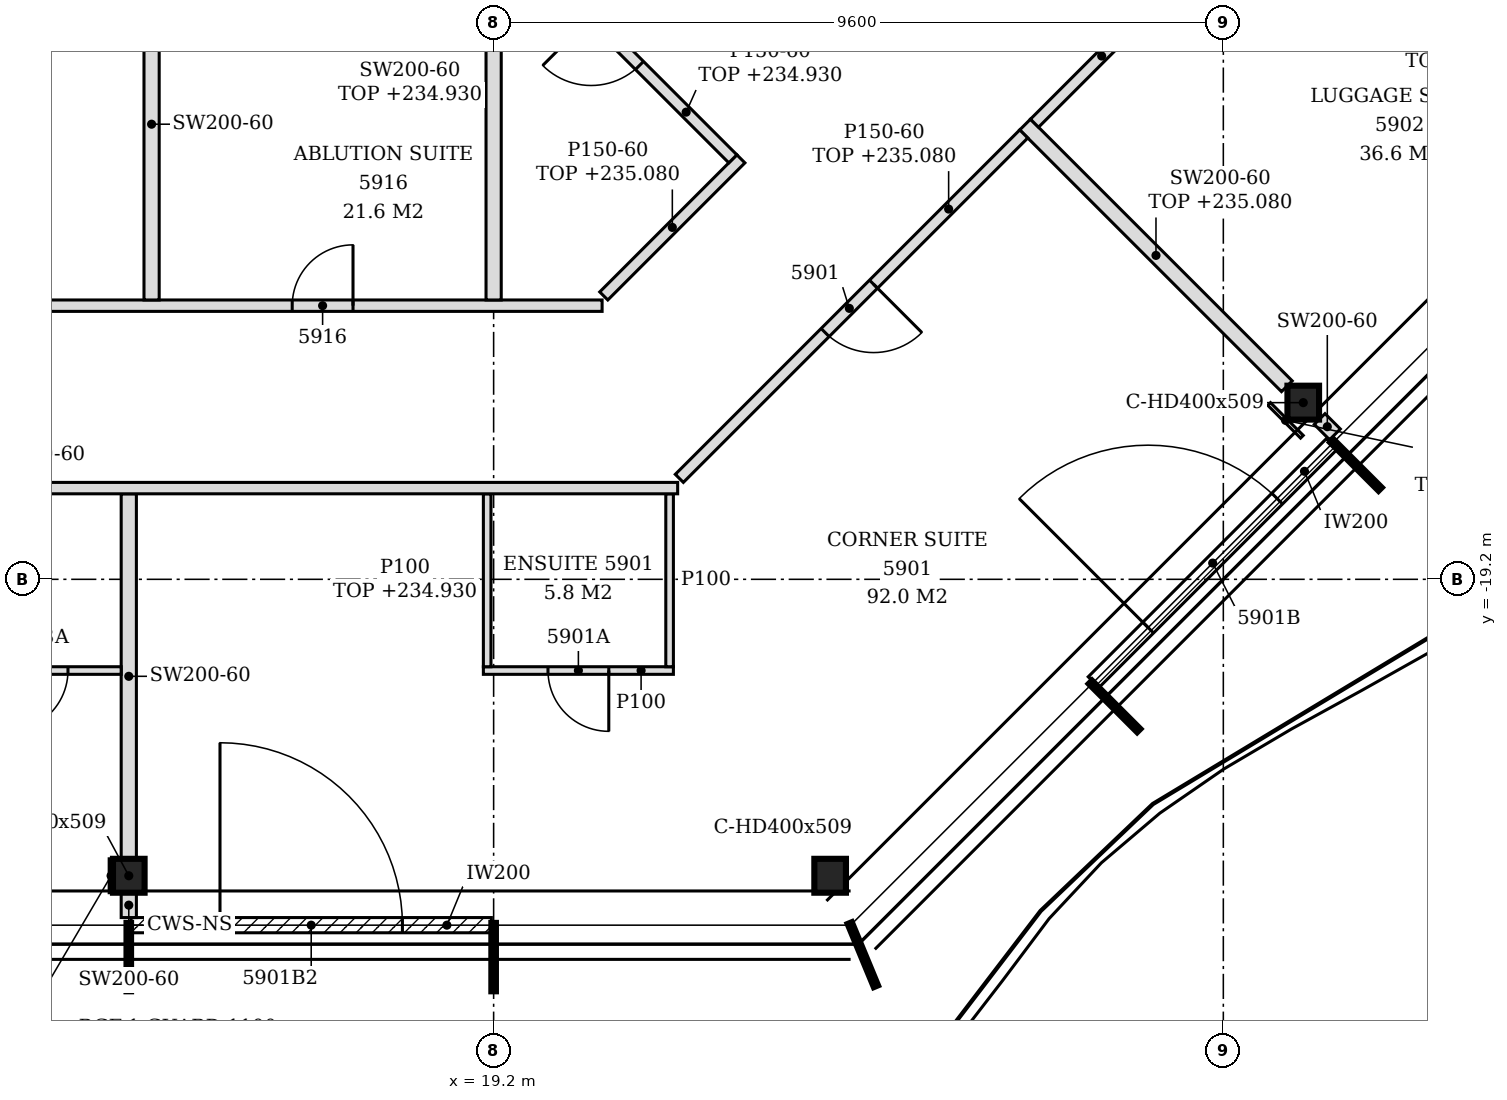
"""IFC4 building model, lengths in metres.
Left out: names, types, materials, properties, quantities, classifications, styles, units other than length and angle.
Written with IfcOpenShell. Run it as: python <this file> out.ifc"""

import sys

from ifc_helpers import new_model, si_unit, direction, frame, frame_2d, origin, origin_2d, place, context, subcontext, project, spatial, polyline, rectangle, i_section, outline, extrude, element, fill, save


model = new_model("IFC4")
c1 = context("Model", 3, precision=1e-05, world=origin(), true_north=direction((0.0, 1.0)))
c2 = subcontext(c1, "Body", "Model", "MODEL_VIEW")
j1 = project(units=[si_unit("LENGTHUNIT", "METRE"), si_unit("PLANEANGLEUNIT", "RADIAN")], contexts=[c1])
p1 = place(None, origin())
s1 = spatial("IfcSite", under=j1, at=p1, CompositionType="ELEMENT")
p2 = place(p1, origin())
s2 = spatial("IfcBuilding", under=s1, at=p2, CompositionType="ELEMENT")
p3 = place(p2, frame((0.0, 0.0, 232.2)))
s3 = spatial("IfcBuildingStorey", under=s2, at=p3, CompositionType="ELEMENT", Elevation=232.2)
for number, where, z_axis, x_axis in (
    (1, (14.4, -23.1, -0.15), (0.0, 0.0, 1.0), (1.0, 0.0, 0.0)),
    (2, (23.627, -23.1, -0.15), (0.0, 0.0, 1.0), (1.0, 0.0, 0.0)),
    (3, (29.852, -16.876, -0.15), (0.0, 0.0, 1.0), (1.0, 0.0, 0.0)),
):
    element("IfcColumn", number, at=place(p3, frame(where, z_axis=z_axis, x_axis=x_axis)), inside=s3, PredefinedType="COLUMN", context=c2, shape_type="SweptSolid", body=[
        extrude(i_section(OverallWidth=0.416, OverallDepth=0.446, WebThickness=0.039, FlangeThickness=0.063, FilletRadius=0.015, at=origin_2d()), origin(), (0.0, 0.0, 1.0), 3.6),
    ])
p4 = place(p3, frame((14.43, -23.75, 0.0), z_axis=(0.0, 0.0, 1.0), x_axis=(1.0, 0.0, 0.0)))
e4 = element("IfcWall", 4, at=p4, inside=s3, PredefinedType="NOTDEFINED", context=c2, shape_type="SweptSolid", body=[
    extrude(rectangle(XDim=4.74, YDim=0.2, at=frame_2d((2.37, 0.0))), origin(), (0.0, 0.0, 1.0), 3.45),
])
p5 = place(p4, frame((1.17, 0.0, 0.0)))
e5 = element("IfcOpeningElement", 5, at=p5, cuts=e4, PredefinedType="OPENING", context=c2, shape_type="SweptSolid", body=[
    extrude(rectangle(XDim=2.4, YDim=2.4, at=frame_2d((1.2, 1.2))), frame((0.0, 0.11, 0.0), z_axis=(0.0, -1.0, 0.0), x_axis=(1.0, 0.0, 0.0)), (0.0, 0.0, 1.0), 0.22),
])
p6 = place(p3, frame((27.093, -20.553, 0.0), z_axis=(0.0, 0.0, 1.0), x_axis=(0.707079231393, 0.707134329907, 0.0)))
e6 = element("IfcWall", 6, at=p6, inside=s3, PredefinedType="NOTDEFINED", context=c2, shape_type="SweptSolid", body=[
    extrude(rectangle(XDim=4.431, YDim=0.2, at=frame_2d((2.215, 0.0))), origin(), (0.0, 0.0, 1.0), 3.45),
])
p7 = place(p6, frame((1.015, 0.0, 0.0)))
e7 = element("IfcOpeningElement", 7, at=p7, cuts=e6, PredefinedType="OPENING", context=c2, shape_type="SweptSolid", body=[
    extrude(rectangle(XDim=2.4, YDim=2.4, at=frame_2d((1.2, 1.2))), frame((0.0, 0.11, 0.0), z_axis=(0.0, -1.0, 0.0), x_axis=(1.0, 0.0, 0.0)), (0.0, 0.0, 1.0), 0.22),
])
p8 = place(p3, frame((14.4, -23.65, 0.0), z_axis=(0.0, 0.0, 1.0), x_axis=(0.0, 1.0, 0.0)))
e8 = element("IfcWall", 8, at=p8, inside=s3, PredefinedType="PARTITIONING", context=c2, shape_type="SweptSolid", body=[
    extrude(rectangle(XDim=0.327, YDim=0.2, at=frame_2d((0.164, 0.0))), origin(), (0.0, 0.0, 1.0), 3.45),
])
p9 = place(p3, frame((14.4, -22.877, 0.0), z_axis=(0.0, 0.0, 1.0), x_axis=(0.0, 1.0, 0.0)))
e9 = element("IfcWall", 9, at=p9, inside=s3, PredefinedType="PARTITIONING", context=c2, shape_type="SweptSolid", body=[
    extrude(outline(polyline([(0.0, 0.0), (4.802, 0.0), (4.802, 3.45), (3.782, 3.45), (3.78, 2.88), (3.572, 2.88), (3.57, 3.45), (0.0, 3.45), (0.0, 0.0)])), frame((0.0, 0.1, 0.0), z_axis=(0.0, -1.0, 0.0), x_axis=(1.0, 0.0, 0.0)), (0.0, 0.0, 1.0), 0.2),
])
p10 = place(p3, frame((11.95, -20.4, 0.0), z_axis=(0.0, 0.0, 1.0), x_axis=(1.0, 0.0, 0.0)))
e10 = element("IfcWall", 10, at=p10, inside=s3, PredefinedType="PARTITIONING", context=c2, shape_type="SweptSolid", body=[
    extrude(rectangle(XDim=2.35, YDim=0.1, at=frame_2d((1.175, 0.0))), origin(), (0.0, 0.0, 1.0), 3.45),
])
p11 = place(p10, frame((0.85, 0.0, 0.0)))
e11 = element("IfcOpeningElement", 11, at=p11, cuts=e10, PredefinedType="OPENING", context=c2, shape_type="SweptSolid", body=[
    extrude(rectangle(XDim=0.8, YDim=2.1, at=frame_2d((0.4, 1.05))), frame((0.0, 0.06, 0.0), z_axis=(0.0, -1.0, 0.0), x_axis=(1.0, 0.0, 0.0)), (0.0, 0.0, 1.0), 0.12),
])
p12 = place(p3, frame((19.065, -20.4, 0.0), z_axis=(0.0, 0.0, 1.0), x_axis=(1.0, 0.0, 0.0)))
e12 = element("IfcWall", 12, at=p12, inside=s3, PredefinedType="PARTITIONING", context=c2, shape_type="SweptSolid", body=[
    extrude(outline(polyline([(0.0, 0.0), (2.5, 0.0), (2.5, 3.45), (0.285, 3.45), (0.283, 2.73), (0.0, 2.73), (0.0, 0.0)])), frame((0.0, 0.05, 0.0), z_axis=(0.0, -1.0, 0.0), x_axis=(1.0, 0.0, 0.0)), (0.0, 0.0, 1.0), 0.1),
])
p13 = place(p12, frame((0.85, 0.0, 0.0)))
e13 = element("IfcOpeningElement", 13, at=p13, cuts=e12, PredefinedType="OPENING", context=c2, shape_type="SweptSolid", body=[
    extrude(rectangle(XDim=0.8, YDim=2.1, at=frame_2d((0.4, 1.05))), frame((0.0, 0.06, 0.0), z_axis=(0.0, -1.0, 0.0), x_axis=(1.0, 0.0, 0.0)), (0.0, 0.0, 1.0), 0.12),
])
p14 = place(p3, frame((19.115, -20.35, 0.0), z_axis=(0.0, 0.0, 1.0), x_axis=(0.0, 1.0, 0.0)))
e14 = element("IfcWall", 14, at=p14, inside=s3, PredefinedType="PARTITIONING", context=c2, shape_type="SweptSolid", body=[
    extrude(rectangle(XDim=2.275, YDim=0.1, at=frame_2d((1.138, 0.0))), origin(), (0.0, 0.0, 1.0), 2.73),
])
p15 = place(p3, frame((21.515, -20.35, 0.0), z_axis=(0.0, 0.0, 1.0), x_axis=(0.0, 1.0, 0.0)))
e15 = element("IfcWall", 15, at=p15, inside=s3, PredefinedType="PARTITIONING", context=c2, shape_type="SweptSolid", body=[
    extrude(outline(polyline([(0.0, 0.0), (2.275, 0.0), (2.275, 3.45), (1.245, 3.45), (1.243, 2.98), (1.055, 2.98), (1.053, 3.45), (0.0, 3.45), (0.0, 0.0)])), frame((0.0, 0.05, 0.0), z_axis=(0.0, -1.0, 0.0), x_axis=(1.0, 0.0, 0.0)), (0.0, 0.0, 1.0), 0.1),
])
p16 = place(p3, frame((-0.726, -18.0, 0.0), z_axis=(0.0, 0.0, 1.0), x_axis=(1.0, 0.0, 0.0)))
e16 = element("IfcWall", 16, at=p16, inside=s3, PredefinedType="PARTITIONING", context=c2, shape_type="SweptSolid", body=[
    extrude(outline(polyline([(0.0, 0.0), (22.347, 0.0), (22.347, 3.45), (20.076, 3.45), (20.074, 2.73), (19.776, 2.73), (19.774, 3.45), (8.076, 3.45), (8.074, 2.73), (7.776, 2.73), (7.774, 3.45), (1.086, 3.45), (1.084, 2.93), (0.512, 2.93), (0.51, 3.45), (0.0, 3.45), (0.0, 0.0)])), frame((0.0, 0.075, 0.0), z_axis=(0.0, -1.0, 0.0), x_axis=(1.0, 0.0, 0.0)), (0.0, 0.0, 1.0), 0.15),
])
p17 = place(p16, frame((5.676, 0.0, 0.0)))
e17 = element("IfcOpeningElement", 17, at=p17, cuts=e16, PredefinedType="OPENING", context=c2, shape_type="SweptSolid", body=[
    extrude(rectangle(XDim=0.9, YDim=2.1, at=frame_2d((0.45, 1.05))), frame((0.0, 0.085, 0.0), z_axis=(0.0, -1.0, 0.0), x_axis=(1.0, 0.0, 0.0)), (0.0, 0.0, 1.0), 0.17),
])
p18 = place(p3, frame((21.643, -17.872, 0.0), z_axis=(0.0, 0.0, 1.0), x_axis=(0.707106781187, 0.707106781187, 0.0)))
e18 = element("IfcWall", 18, at=p18, inside=s3, PredefinedType="PARTITIONING", context=c2, shape_type="SweptSolid", body=[
    extrude(rectangle(XDim=6.408, YDim=0.15, at=frame_2d((3.204, 0.0))), origin(), (0.0, 0.0, 1.0), 2.88),
])
p19 = place(p18, frame((2.713, 0.0, 0.0)))
e19 = element("IfcOpeningElement", 19, at=p19, cuts=e18, PredefinedType="OPENING", context=c2, shape_type="SweptSolid", body=[
    extrude(rectangle(XDim=0.9, YDim=2.1, at=frame_2d((0.45, 1.05))), frame((0.0, 0.085, 0.0), z_axis=(0.0, -1.0, 0.0), x_axis=(1.0, 0.0, 0.0)), (0.0, 0.0, 1.0), 0.17),
])
p20 = place(p3, frame((30.269, -17.293, 0.0), z_axis=(0.0, 0.0, 1.0), x_axis=(-0.707534941396, 0.706678361564, 0.0)))
e20 = element("IfcWall", 20, at=p20, inside=s3, PredefinedType="PARTITIONING", context=c2, shape_type="SweptSolid", body=[
    extrude(rectangle(XDim=0.285, YDim=0.2, at=frame_2d((0.143, 0.0))), origin(), (0.0, 0.0, 1.0), 3.45),
])
p21 = place(p3, frame((29.636, -16.66, 0.0), z_axis=(0.0, 0.0, 1.0), x_axis=(-0.707207037357, 0.707006510799, 0.0)))
e21 = element("IfcWall", 21, at=p21, inside=s3, PredefinedType="PARTITIONING", context=c2, shape_type="SweptSolid", body=[
    extrude(rectangle(XDim=4.87, YDim=0.2, at=frame_2d((2.435, 0.0))), origin(), (0.0, 0.0, 1.0), 2.88),
])
p22 = place(p3, frame((-0.312, -15.6, 0.0), z_axis=(0.0, 0.0, 1.0), x_axis=(1.0, 0.0, 0.0)))
e22 = element("IfcWall", 22, at=p22, inside=s3, PredefinedType="PARTITIONING", context=c2, shape_type="SweptSolid", body=[
    extrude(outline(polyline([(0.0, 0.0), (20.939, 0.0), (20.939, 3.45), (19.662, 3.45), (19.66, 2.73), (19.362, 2.73), (19.36, 3.45), (7.662, 3.45), (7.66, 2.73), (7.362, 2.73), (7.36, 3.45), (0.0, 3.45), (0.0, 0.0)])), frame((0.0, 0.075, 0.0), z_axis=(0.0, -1.0, 0.0), x_axis=(1.0, 0.0, 0.0)), (0.0, 0.0, 1.0), 0.15),
])
p23 = place(p22, frame((16.862, 0.0, 0.0)))
e23 = element("IfcOpeningElement", 23, at=p23, cuts=e22, PredefinedType="OPENING", context=c2, shape_type="SweptSolid", body=[
    extrude(rectangle(XDim=0.8, YDim=2.1, at=frame_2d((0.4, 1.05))), frame((0.0, 0.085, 0.0), z_axis=(0.0, -1.0, 0.0), x_axis=(1.0, 0.0, 0.0)), (0.0, 0.0, 1.0), 0.17),
])
p24 = place(p3, frame((14.7, -15.525, 0.0), z_axis=(0.0, 0.0, 1.0), x_axis=(0.0, 1.0, 0.0)))
e24 = element("IfcWall", 24, at=p24, inside=s3, PredefinedType="PARTITIONING", context=c2, shape_type="SweptSolid", body=[
    extrude(outline(polyline([(0.0, 0.0), (4.625, 0.0), (4.625, 3.45), (1.23, 3.45), (1.228, 2.88), (1.02, 2.88), (1.018, 3.45), (0.0, 3.45), (0.0, 0.0)])), frame((0.0, 0.1, 0.0), z_axis=(0.0, -1.0, 0.0), x_axis=(1.0, 0.0, 0.0)), (0.0, 0.0, 1.0), 0.2),
])
p25 = place(p3, frame((19.2, -15.525, 0.0), z_axis=(0.0, 0.0, 1.0), x_axis=(0.0, 1.0, 0.0)))
e25 = element("IfcWall", 25, at=p25, inside=s3, PredefinedType="PARTITIONING", context=c2, shape_type="SweptSolid", body=[
    extrude(rectangle(XDim=5.12, YDim=0.2, at=frame_2d((2.56, 0.0))), origin(), (0.0, 0.0, 1.0), 2.73),
])
p26 = place(p3, frame((20.649, -15.472, 0.0), z_axis=(0.0, 0.0, 1.0), x_axis=(0.707106781187, 0.707106781187, 0.0)))
e26 = element("IfcWall", 26, at=p26, inside=s3, PredefinedType="PARTITIONING", context=c2, shape_type="SweptSolid", body=[
    extrude(rectangle(XDim=2.551, YDim=0.15, at=frame_2d((1.276, 0.0))), origin(), (0.0, 0.0, 1.0), 2.88),
])
p27 = place(p3, frame((22.347, -13.668, 0.0), z_axis=(0.0, 0.0, 1.0), x_axis=(-0.707106781187, 0.707106781187, 0.0)))
e27 = element("IfcWall", 27, at=p27, inside=s3, PredefinedType="PARTITIONING", context=c2, shape_type="SweptSolid", body=[
    extrude(rectangle(XDim=4.234, YDim=0.15, at=frame_2d((2.117, 0.0))), origin(), (0.0, 0.0, 1.0), 2.73),
])
p28 = place(p27, frame((1.737, 0.0, 0.0)))
e28 = element("IfcOpeningElement", 28, at=p28, cuts=e27, PredefinedType="OPENING", context=c2, shape_type="SweptSolid", body=[
    extrude(rectangle(XDim=0.9, YDim=2.1, at=frame_2d((0.45, 1.05))), frame((0.0, 0.085, 0.0), z_axis=(0.0, -1.0, 0.0), x_axis=(1.0, 0.0, 0.0)), (0.0, 0.0, 1.0), 0.17),
])
p29 = place(p3, frame((26.316, -13.199, 0.0), z_axis=(0.0, 0.0, 1.0), x_axis=(0.707024001185, 0.707189551498, 0.0)))
e29 = element("IfcWall", 29, at=p29, inside=s3, PredefinedType="PARTITIONING", context=c2, shape_type="SweptSolid", body=[
    extrude(rectangle(XDim=5.899, YDim=0.15, at=frame_2d((2.949, 0.0))), origin(), (0.0, 0.0, 1.0), 2.88),
])
p30 = place(p29, frame((2.5, 0.0, 0.0)))
e30 = element("IfcOpeningElement", 30, at=p30, cuts=e29, PredefinedType="OPENING", context=c2, shape_type="SweptSolid", body=[
    extrude(rectangle(XDim=0.9, YDim=2.1, at=frame_2d((0.45, 1.05))), frame((0.0, 0.085, 0.0), z_axis=(0.0, -1.0, 0.0), x_axis=(1.0, 0.0, 0.0)), (0.0, 0.0, 1.0), 0.17),
])
p31 = place(p3, frame((34.581, -12.981, 0.0), z_axis=(0.0, 0.0, 1.0), x_axis=(-0.707133900936, 0.707079660397, 0.0)))
e31 = element("IfcWall", 31, at=p31, inside=s3, PredefinedType="PARTITIONING", context=c2, shape_type="SweptSolid", body=[
    extrude(rectangle(XDim=4.501, YDim=0.2, at=frame_2d((2.25, 0.0))), origin(), (0.0, 0.0, 1.0), 2.63),
])
p32 = place(p3, frame((14.167, -23.323, 0.0), z_axis=(0.0, 0.0, 1.0), x_axis=(0.0, 1.0, 0.0)))
e32 = element("IfcWall", 32, at=p32, inside=s3, PredefinedType="PARTITIONING", context=c2, shape_type="SweptSolid", body=[
    extrude(rectangle(XDim=0.446, YDim=0.05, at=frame_2d((0.223, 0.0))), origin(), (0.0, 0.0, 1.0), 2.93),
])
p33 = place(p3, frame((29.834, -17.324, 0.0), z_axis=(0.0, 0.0, 1.0), x_axis=(-0.707106781187, 0.707106781187, 0.0)))
e33 = element("IfcWall", 33, at=p33, inside=s3, PredefinedType="PARTITIONING", context=c2, shape_type="SweptSolid", body=[
    extrude(rectangle(XDim=0.61, YDim=0.05, at=frame_2d((0.305, 0.0))), origin(), (0.0, 0.0, 1.0), 2.93),
])
p34 = place(p5, origin())
e34 = element("IfcDoor", 34, at=p34, inside=s3, OperationType="SINGLE_SWING_LEFT", PredefinedType="DOOR", context=c2, shape_type="SweptSolid", body=[
    extrude(rectangle(XDim=2.4, YDim=2.4, at=frame_2d((1.2, 1.2))), frame((0.0, 0.025, 0.0), z_axis=(0.0, -1.0, 0.0), x_axis=(1.0, 0.0, 0.0)), (0.0, 0.0, 1.0), 0.05),
])
fill(e5, e34)
p35 = place(p7, origin())
e35 = element("IfcDoor", 35, at=p35, inside=s3, OperationType="SINGLE_SWING_LEFT", PredefinedType="DOOR", context=c2, shape_type="SweptSolid", body=[
    extrude(rectangle(XDim=2.4, YDim=2.4, at=frame_2d((1.2, 1.2))), frame((0.0, 0.025, 0.0), z_axis=(0.0, -1.0, 0.0), x_axis=(1.0, 0.0, 0.0)), (0.0, 0.0, 1.0), 0.05),
])
fill(e7, e35)
p36 = place(p19, frame((0.9, 0.0, 0.0), z_axis=(0.0, 0.0, 1.0), x_axis=(-1.0, 0.0, 0.0)))
e36 = element("IfcDoor", 36, at=p36, inside=s3, OperationType="SINGLE_SWING_LEFT", PredefinedType="DOOR", context=c2, shape_type="SweptSolid", body=[
    extrude(rectangle(XDim=0.9, YDim=2.1, at=frame_2d((0.45, 1.05))), frame((0.0, 0.025, 0.0), z_axis=(0.0, -1.0, 0.0), x_axis=(1.0, 0.0, 0.0)), (0.0, 0.0, 1.0), 0.05),
])
fill(e19, e36)
p37 = place(p13, frame((0.8, 0.0, 0.0), z_axis=(0.0, 0.0, 1.0), x_axis=(-1.0, 0.0, 0.0)))
e37 = element("IfcDoor", 37, at=p37, inside=s3, OperationType="SINGLE_SWING_LEFT", PredefinedType="DOOR", context=c2, shape_type="SweptSolid", body=[
    extrude(rectangle(XDim=0.8, YDim=2.1, at=frame_2d((0.4, 1.05))), frame((0.0, 0.025, 0.0), z_axis=(0.0, -1.0, 0.0), x_axis=(1.0, 0.0, 0.0)), (0.0, 0.0, 1.0), 0.05),
])
fill(e13, e37)
p38 = place(p11, frame((0.8, 0.0, 0.0), z_axis=(0.0, 0.0, 1.0), x_axis=(-1.0, 0.0, 0.0)))
e38 = element("IfcDoor", 38, at=p38, inside=s3, OperationType="SINGLE_SWING_RIGHT", PredefinedType="DOOR", context=c2, shape_type="SweptSolid", body=[
    extrude(rectangle(XDim=0.8, YDim=2.1, at=frame_2d((0.4, 1.05))), frame((0.0, 0.025, 0.0), z_axis=(0.0, -1.0, 0.0), x_axis=(1.0, 0.0, 0.0)), (0.0, 0.0, 1.0), 0.05),
])
fill(e11, e38)
p39 = place(p23, origin())
e39 = element("IfcDoor", 39, at=p39, inside=s3, OperationType="SINGLE_SWING_RIGHT", PredefinedType="DOOR", context=c2, shape_type="SweptSolid", body=[
    extrude(rectangle(XDim=0.8, YDim=2.1, at=frame_2d((0.4, 1.05))), frame((0.0, 0.025, 0.0), z_axis=(0.0, -1.0, 0.0), x_axis=(1.0, 0.0, 0.0)), (0.0, 0.0, 1.0), 0.05),
])
fill(e23, e39)
p40 = place(p28, origin())
e40 = element("IfcDoor", 40, at=p40, inside=s3, OperationType="SINGLE_SWING_RIGHT", PredefinedType="DOOR", context=c2, shape_type="SweptSolid", body=[
    extrude(rectangle(XDim=0.9, YDim=2.1, at=frame_2d((0.45, 1.05))), frame((0.0, 0.025, 0.0), z_axis=(0.0, -1.0, 0.0), x_axis=(1.0, 0.0, 0.0)), (0.0, 0.0, 1.0), 0.05),
])
fill(e28, e40)
save(model, sys.argv[1])
